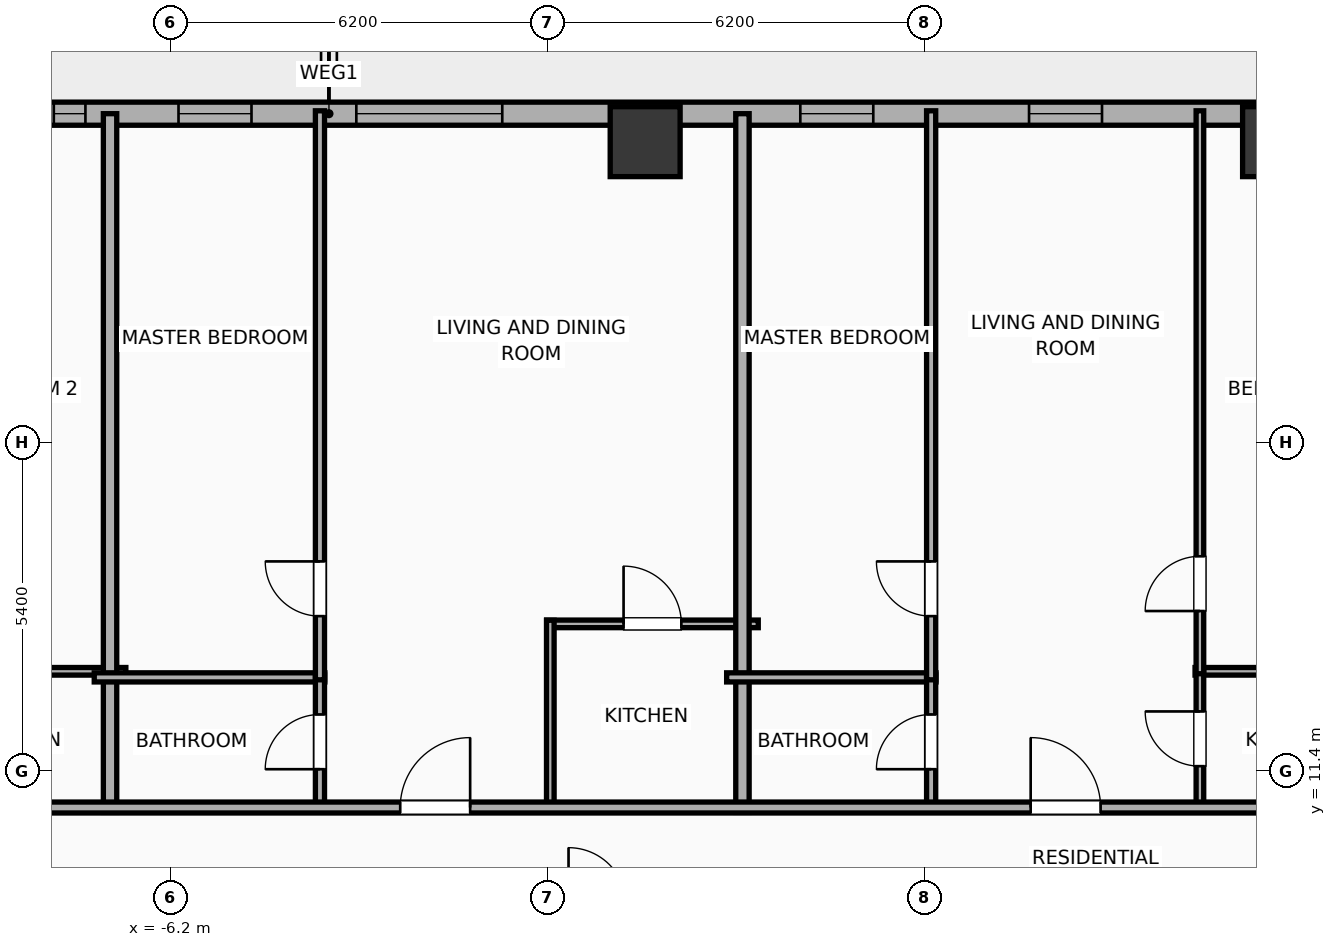
"""IFC4 building model, lengths in metres.
Left out: names, types, materials, properties, quantities, classifications, styles, units other than length and angle.
Written with IfcOpenShell. Run it as: python <this file> out.ifc"""

import sys

from ifc_helpers import new_model, si_unit, direction, frame, frame_2d, origin, origin_2d, place, context, subcontext, project, spatial, rectangle, hollow_rectangle, extrude, element, fill, save


model = new_model("IFC4")
c1 = context("Model", 3, precision=1e-05, world=origin(), true_north=direction((0.0, 1.0)))
c2 = subcontext(c1, "Body", "Model", "MODEL_VIEW")
j1 = project(units=[si_unit("LENGTHUNIT", "METRE"), si_unit("PLANEANGLEUNIT", "RADIAN")], contexts=[c1])
p1 = place(None, origin())
s1 = spatial("IfcSite", under=j1, at=p1, CompositionType="ELEMENT")
p2 = place(p1, origin())
s2 = spatial("IfcBuilding", under=s1, at=p2, CompositionType="ELEMENT")
p3 = place(p2, frame((0.0, 0.0, 53.3)))
s3 = spatial("IfcBuildingStorey", under=s2, at=p3, CompositionType="ELEMENT", Elevation=53.3)
for number, where, z_axis, x_axis in (
    (1, (12.0, 21.75, 0.0), (0.0, 0.0, 1.0), (1.0, 0.0, 0.0)),
    (2, (1.6, 21.75, 0.0), (0.0, 0.0, 1.0), (1.0, 0.0, 0.0)),
):
    element("IfcColumn", number, at=place(p3, frame(where, z_axis=z_axis, x_axis=x_axis)), inside=s3, PredefinedType="COLUMN", context=c2, shape_type="SweptSolid", body=[
        extrude(hollow_rectangle(XDim=1.15, YDim=1.15, WallThickness=0.04, at=origin_2d()), origin(), (0.0, 0.0, 1.0), 3.9),
    ])
p4 = place(p3, frame((-29.581, 22.21, 0.0), z_axis=(0.0, 0.0, 1.0), x_axis=(1.0, 0.0, 0.0)))
e3 = element("IfcWall", 3, at=p4, inside=s3, PredefinedType="ELEMENTEDWALL", context=c2, shape_type="SweptSolid", body=[
    extrude(rectangle(XDim=51.963, YDim=0.38, at=frame_2d((25.981, 0.0))), origin(), (0.0, 0.0, 1.0), 3.65),
])
p5 = place(p4, frame((6.61, 0.0, 0.75)))
e4 = element("IfcOpeningElement", 4, at=p5, cuts=e3, PredefinedType="OPENING", context=c2, shape_type="SweptSolid", body=[
    extrude(rectangle(XDim=2.4, YDim=2.1, at=frame_2d((1.2, 1.05))), frame((0.0, 0.2, 0.0), z_axis=(0.0, -1.0, 0.0), x_axis=(1.0, 0.0, 0.0)), (0.0, 0.0, 1.0), 0.4),
])
p6 = place(p4, frame((26.431, 0.0, 0.75)))
e5 = element("IfcOpeningElement", 5, at=p6, cuts=e3, PredefinedType="OPENING", context=c2, shape_type="SweptSolid", body=[
    extrude(rectangle(XDim=2.4, YDim=2.1, at=frame_2d((1.2, 1.05))), frame((0.0, 0.2, 0.0), z_axis=(0.0, -1.0, 0.0), x_axis=(1.0, 0.0, 0.0)), (0.0, 0.0, 1.0), 0.4),
])
p7 = place(p4, frame((43.752, 0.0, 0.75)))
e6 = element("IfcOpeningElement", 6, at=p7, cuts=e3, PredefinedType="OPENING", context=c2, shape_type="SweptSolid", body=[
    extrude(rectangle(XDim=2.4, YDim=2.1, at=frame_2d((1.2, 1.05))), frame((0.0, 0.2, 0.0), z_axis=(0.0, -1.0, 0.0), x_axis=(1.0, 0.0, 0.0)), (0.0, 0.0, 1.0), 0.4),
])
p8 = place(p4, frame((2.789, 0.0, 0.75)))
e7 = element("IfcOpeningElement", 7, at=p8, cuts=e3, PredefinedType="OPENING", context=c2, shape_type="SweptSolid", body=[
    extrude(rectangle(XDim=1.2, YDim=2.05, at=frame_2d((0.6, 1.025))), frame((0.0, 0.2, 0.0), z_axis=(0.0, -1.0, 0.0), x_axis=(1.0, 0.0, 0.0)), (0.0, 0.0, 1.0), 0.4),
])
p9 = place(p4, frame((16.831, 0.0, 0.75)))
e8 = element("IfcOpeningElement", 8, at=p9, cuts=e3, PredefinedType="OPENING", context=c2, shape_type="SweptSolid", body=[
    extrude(rectangle(XDim=1.2, YDim=2.05, at=frame_2d((0.6, 1.025))), frame((0.0, 0.2, 0.0), z_axis=(0.0, -1.0, 0.0), x_axis=(1.0, 0.0, 0.0)), (0.0, 0.0, 1.0), 0.4),
])
p10 = place(p4, frame((13.136, 0.0, 0.75)))
e9 = element("IfcOpeningElement", 9, at=p10, cuts=e3, PredefinedType="OPENING", context=c2, shape_type="SweptSolid", body=[
    extrude(rectangle(XDim=1.2, YDim=2.05, at=frame_2d((0.6, 1.025))), frame((0.0, 0.2, 0.0), z_axis=(0.0, -1.0, 0.0), x_axis=(1.0, 0.0, 0.0)), (0.0, 0.0, 1.0), 0.4),
])
p11 = place(p4, frame((21.456, 0.0, 0.75)))
e10 = element("IfcOpeningElement", 10, at=p11, cuts=e3, PredefinedType="OPENING", context=c2, shape_type="SweptSolid", body=[
    extrude(rectangle(XDim=0.52, YDim=2.05, at=frame_2d((0.26, 1.025))), frame((0.0, 0.2, 0.0), z_axis=(0.0, -1.0, 0.0), x_axis=(1.0, 0.0, 0.0)), (0.0, 0.0, 1.0), 0.4),
])
p12 = place(p4, frame((23.507, 0.0, 0.75)))
e11 = element("IfcOpeningElement", 11, at=p12, cuts=e3, PredefinedType="OPENING", context=c2, shape_type="SweptSolid", body=[
    extrude(rectangle(XDim=1.2, YDim=2.05, at=frame_2d((0.6, 1.025))), frame((0.0, 0.2, 0.0), z_axis=(0.0, -1.0, 0.0), x_axis=(1.0, 0.0, 0.0)), (0.0, 0.0, 1.0), 0.4),
])
p13 = place(p4, frame((37.494, 0.0, 0.75)))
e12 = element("IfcOpeningElement", 12, at=p13, cuts=e3, PredefinedType="OPENING", context=c2, shape_type="SweptSolid", body=[
    extrude(rectangle(XDim=1.2, YDim=2.05, at=frame_2d((0.6, 1.025))), frame((0.0, 0.2, 0.0), z_axis=(0.0, -1.0, 0.0), x_axis=(1.0, 0.0, 0.0)), (0.0, 0.0, 1.0), 0.4),
])
p14 = place(p4, frame((33.733, 0.0, 0.75)))
e13 = element("IfcOpeningElement", 13, at=p14, cuts=e3, PredefinedType="OPENING", context=c2, shape_type="SweptSolid", body=[
    extrude(rectangle(XDim=1.2, YDim=2.05, at=frame_2d((0.6, 1.025))), frame((0.0, 0.2, 0.0), z_axis=(0.0, -1.0, 0.0), x_axis=(1.0, 0.0, 0.0)), (0.0, 0.0, 1.0), 0.4),
])
p15 = place(p4, frame((42.323, 0.0, 0.75)))
e14 = element("IfcOpeningElement", 14, at=p15, cuts=e3, PredefinedType="OPENING", context=c2, shape_type="SweptSolid", body=[
    extrude(rectangle(XDim=0.52, YDim=2.05, at=frame_2d((0.26, 1.025))), frame((0.0, 0.2, 0.0), z_axis=(0.0, -1.0, 0.0), x_axis=(1.0, 0.0, 0.0)), (0.0, 0.0, 1.0), 0.4),
])
p16 = place(p4, frame((47.601, 0.0, 0.75)))
e15 = element("IfcOpeningElement", 15, at=p16, cuts=e3, PredefinedType="OPENING", context=c2, shape_type="SweptSolid", body=[
    extrude(rectangle(XDim=1.2, YDim=2.05, at=frame_2d((0.6, 1.025))), frame((0.0, 0.2, 0.0), z_axis=(0.0, -1.0, 0.0), x_axis=(1.0, 0.0, 0.0)), (0.0, 0.0, 1.0), 0.4),
])
p17 = place(p4, frame((49.681, 0.0, 0.75)))
e16 = element("IfcOpeningElement", 16, at=p17, cuts=e3, PredefinedType="OPENING", context=c2, shape_type="SweptSolid", body=[
    extrude(rectangle(XDim=1.2, YDim=2.05, at=frame_2d((0.6, 1.025))), frame((0.0, 0.2, 0.0), z_axis=(0.0, -1.0, 0.0), x_axis=(1.0, 0.0, 0.0)), (0.0, 0.0, 1.0), 0.4),
])
p18 = place(p3, frame((-10.29, 13.04, 0.0), z_axis=(0.0, 0.0, 1.0), x_axis=(1.0, 0.0, 0.0)))
e17 = element("IfcWall", 17, at=p18, inside=s3, PredefinedType="PARTITIONING", context=c2, shape_type="SweptSolid", body=[
    extrude(rectangle(XDim=3.35, YDim=0.125, at=frame_2d((1.675, 0.0))), origin(), (0.0, 0.0, 1.0), 3.65),
])
p19 = place(p3, frame((-7.2, 10.72, 0.0), z_axis=(0.0, 0.0, 1.0), x_axis=(0.0, 1.0, 0.0)))
e18 = element("IfcWall", 18, at=p19, inside=s3, PredefinedType="PARTITIONING", context=c2, shape_type="SweptSolid", body=[
    extrude(rectangle(XDim=11.49, YDim=0.22, at=frame_2d((5.745, 0.0))), origin(), (0.0, 0.0, 1.0), 3.65),
])
p20 = place(p3, frame((-7.46, 12.94, 0.0), z_axis=(0.0, 0.0, 1.0), x_axis=(1.0, 0.0, 0.0)))
e19 = element("IfcWall", 19, at=p20, inside=s3, PredefinedType="PLUMBINGWALL", context=c2, shape_type="SweptSolid", body=[
    extrude(rectangle(XDim=3.792, YDim=0.15, at=frame_2d((1.896, 0.0))), origin(), (0.0, 0.0, 1.0), 3.65),
])
p21 = place(p3, frame((-3.748, 10.78, 0.0), z_axis=(0.0, 0.0, 1.0), x_axis=(0.0, 1.0, 0.0)))
e20 = element("IfcWall", 20, at=p21, inside=s3, PredefinedType="PLUMBINGWALL", context=c2, shape_type="SweptSolid", body=[
    extrude(rectangle(XDim=2.2, YDim=0.15, at=frame_2d((1.1, 0.0))), origin(), (0.0, 0.0, 1.0), 3.65),
])
p22 = place(p21, frame((0.65, 0.0, 0.0)))
e21 = element("IfcOpeningElement", 21, at=p22, cuts=e20, PredefinedType="OPENING", context=c2, shape_type="SweptSolid", body=[
    extrude(rectangle(XDim=0.9, YDim=2.05, at=frame_2d((0.45, 1.025))), frame((0.0, 0.085, 0.0), z_axis=(0.0, -1.0, 0.0), x_axis=(1.0, 0.0, 0.0)), (0.0, 0.0, 1.0), 0.17),
])
p23 = place(p3, frame((-3.748, 12.9, 0.0), z_axis=(0.0, 0.0, 1.0), x_axis=(0.0, 1.0, 0.0)))
e22 = element("IfcWall", 22, at=p23, inside=s3, PredefinedType="PLUMBINGWALL", context=c2, shape_type="SweptSolid", body=[
    extrude(rectangle(XDim=9.358, YDim=0.15, at=frame_2d((4.679, 0.0))), origin(), (0.0, 0.0, 1.0), 3.65),
])
p24 = place(p23, frame((1.047, 0.0, 0.0)))
e23 = element("IfcOpeningElement", 23, at=p24, cuts=e22, PredefinedType="OPENING", context=c2, shape_type="SweptSolid", body=[
    extrude(rectangle(XDim=0.9, YDim=2.05, at=frame_2d((0.45, 1.025))), frame((0.0, 0.085, 0.0), z_axis=(0.0, -1.0, 0.0), x_axis=(1.0, 0.0, 0.0)), (0.0, 0.0, 1.0), 0.17),
])
p25 = place(p3, frame((-0.02, 13.82, 0.0), z_axis=(0.0, 0.0, 1.0), x_axis=(1.0, 0.0, 0.0)))
e24 = element("IfcWall", 24, at=p25, inside=s3, PredefinedType="PARTITIONING", context=c2, shape_type="SweptSolid", body=[
    extrude(rectangle(XDim=3.48, YDim=0.125, at=frame_2d((1.74, 0.0))), origin(), (0.0, 0.0, 1.0), 3.65),
])
p26 = place(p25, frame((1.265, 0.0, 0.0)))
e25 = element("IfcOpeningElement", 25, at=p26, cuts=e24, PredefinedType="OPENING", context=c2, shape_type="SweptSolid", body=[
    extrude(rectangle(XDim=0.95, YDim=2.05, at=frame_2d((0.475, 1.025))), frame((0.0, 0.073, 0.0), z_axis=(0.0, -1.0, 0.0), x_axis=(1.0, 0.0, 0.0)), (0.0, 0.0, 1.0), 0.145),
])
p27 = place(p3, frame((0.04, 10.78, 0.0), z_axis=(0.0, 0.0, 1.0), x_axis=(0.0, 1.0, 0.0)))
e26 = element("IfcWall", 26, at=p27, inside=s3, PredefinedType="PARTITIONING", context=c2, shape_type="SweptSolid", body=[
    extrude(rectangle(XDim=3.1, YDim=0.125, at=frame_2d((1.55, 0.0))), origin(), (0.0, 0.0, 1.0), 3.65),
])
p28 = place(p3, frame((3.2, 10.72, 0.0), z_axis=(0.0, 0.0, 1.0), x_axis=(0.0, 1.0, 0.0)))
e27 = element("IfcWall", 27, at=p28, inside=s3, PredefinedType="PARTITIONING", context=c2, shape_type="SweptSolid", body=[
    extrude(rectangle(XDim=11.49, YDim=0.22, at=frame_2d((5.745, 0.0))), origin(), (0.0, 0.0, 1.0), 2.94),
])
p29 = place(p3, frame((2.94, 12.94, 0.0), z_axis=(0.0, 0.0, 1.0), x_axis=(1.0, 0.0, 0.0)))
e28 = element("IfcWall", 28, at=p29, inside=s3, PredefinedType="PLUMBINGWALL", context=c2, shape_type="SweptSolid", body=[
    extrude(rectangle(XDim=3.443, YDim=0.15, at=frame_2d((1.722, 0.0))), origin(), (0.0, 0.0, 1.0), 3.65),
])
p30 = place(p3, frame((10.643, 13.04, 0.0), z_axis=(0.0, 0.0, 1.0), x_axis=(1.0, 0.0, 0.0)))
e29 = element("IfcWall", 29, at=p30, inside=s3, PredefinedType="PARTITIONING", context=c2, shape_type="SweptSolid", body=[
    extrude(rectangle(XDim=3.217, YDim=0.125, at=frame_2d((1.608, 0.0))), origin(), (0.0, 0.0, 1.0), 3.65),
])
p31 = place(p3, frame((6.303, 10.78, 0.0), z_axis=(0.0, 0.0, 1.0), x_axis=(0.0, 1.0, 0.0)))
e30 = element("IfcWall", 30, at=p31, inside=s3, PredefinedType="PLUMBINGWALL", context=c2, shape_type="SweptSolid", body=[
    extrude(rectangle(XDim=2.2, YDim=0.15, at=frame_2d((1.1, 0.0))), origin(), (0.0, 0.0, 1.0), 3.65),
])
p32 = place(p31, frame((0.65, 0.0, 0.0)))
e31 = element("IfcOpeningElement", 31, at=p32, cuts=e30, PredefinedType="OPENING", context=c2, shape_type="SweptSolid", body=[
    extrude(rectangle(XDim=0.9, YDim=2.05, at=frame_2d((0.45, 1.025))), frame((0.0, 0.085, 0.0), z_axis=(0.0, -1.0, 0.0), x_axis=(1.0, 0.0, 0.0)), (0.0, 0.0, 1.0), 0.17),
])
p33 = place(p3, frame((6.303, 12.9, 0.0), z_axis=(0.0, 0.0, 1.0), x_axis=(0.0, 1.0, 0.0)))
e32 = element("IfcWall", 32, at=p33, inside=s3, PredefinedType="PLUMBINGWALL", context=c2, shape_type="SweptSolid", body=[
    extrude(rectangle(XDim=9.358, YDim=0.15, at=frame_2d((4.679, 0.0))), origin(), (0.0, 0.0, 1.0), 3.65),
])
p34 = place(p33, frame((1.047, 0.0, 0.0)))
e33 = element("IfcOpeningElement", 33, at=p34, cuts=e32, PredefinedType="OPENING", context=c2, shape_type="SweptSolid", body=[
    extrude(rectangle(XDim=0.9, YDim=2.05, at=frame_2d((0.45, 1.025))), frame((0.0, 0.085, 0.0), z_axis=(0.0, -1.0, 0.0), x_axis=(1.0, 0.0, 0.0)), (0.0, 0.0, 1.0), 0.17),
])
p35 = place(p3, frame((10.723, 10.78, 0.0), z_axis=(0.0, 0.0, 1.0), x_axis=(0.0, 1.0, 0.0)))
e34 = element("IfcWall", 34, at=p35, inside=s3, PredefinedType="PARTITIONING", context=c2, shape_type="SweptSolid", body=[
    extrude(rectangle(XDim=2.3, YDim=0.125, at=frame_2d((1.15, 0.0))), origin(), (0.0, 0.0, 1.0), 3.65),
])
p36 = place(p35, frame((0.7, 0.0, 0.0)))
e35 = element("IfcOpeningElement", 35, at=p36, cuts=e34, PredefinedType="OPENING", context=c2, shape_type="SweptSolid", body=[
    extrude(rectangle(XDim=0.9, YDim=2.05, at=frame_2d((0.45, 1.025))), frame((0.0, 0.073, 0.0), z_axis=(0.0, -1.0, 0.0), x_axis=(1.0, 0.0, 0.0)), (0.0, 0.0, 1.0), 0.145),
])
p37 = place(p3, frame((10.723, 13.0, 0.0), z_axis=(0.0, 0.0, 1.0), x_axis=(0.0, 1.0, 0.0)))
e36 = element("IfcWall", 36, at=p37, inside=s3, PredefinedType="PARTITIONING", context=c2, shape_type="SweptSolid", body=[
    extrude(rectangle(XDim=9.258, YDim=0.125, at=frame_2d((4.629, 0.0))), origin(), (0.0, 0.0, 1.0), 3.65),
])
p38 = place(p37, frame((1.031, 0.0, 0.0)))
e37 = element("IfcOpeningElement", 37, at=p38, cuts=e36, PredefinedType="OPENING", context=c2, shape_type="SweptSolid", body=[
    extrude(rectangle(XDim=0.9, YDim=2.05, at=frame_2d((0.45, 1.025))), frame((0.0, 0.073, 0.0), z_axis=(0.0, -1.0, 0.0), x_axis=(1.0, 0.0, 0.0)), (0.0, 0.0, 1.0), 0.145),
])
p39 = place(p3, frame((-33.41, 10.8, 0.0), z_axis=(0.0, 0.0, 1.0), x_axis=(1.0, 0.0, 0.0)))
e38 = element("IfcWall", 38, at=p39, inside=s3, PredefinedType="PARTITIONING", context=c2, shape_type="SweptSolid", body=[
    extrude(rectangle(XDim=59.62, YDim=0.18, at=frame_2d((29.81, 0.0))), origin(), (0.0, 0.0, 1.0), 3.65),
])
p40 = place(p39, frame((2.501, 0.0, 0.0)))
e39 = element("IfcOpeningElement", 39, at=p40, cuts=e38, PredefinedType="OPENING", context=c2, shape_type="SweptSolid", body=[
    extrude(rectangle(XDim=0.9, YDim=2.05, at=frame_2d((0.45, 1.025))), frame((0.0, 0.1, 0.0), z_axis=(0.0, -1.0, 0.0), x_axis=(1.0, 0.0, 0.0)), (0.0, 0.0, 1.0), 0.2),
])
p41 = place(p39, frame((10.156, 0.0, 0.0)))
e40 = element("IfcOpeningElement", 40, at=p41, cuts=e38, PredefinedType="OPENING", context=c2, shape_type="SweptSolid", body=[
    extrude(rectangle(XDim=1.15, YDim=2.05, at=frame_2d((0.575, 1.025))), frame((0.0, 0.1, 0.0), z_axis=(0.0, -1.0, 0.0), x_axis=(1.0, 0.0, 0.0)), (0.0, 0.0, 1.0), 0.2),
])
p42 = place(p39, frame((20.686, 0.0, 0.0)))
e41 = element("IfcOpeningElement", 41, at=p42, cuts=e38, PredefinedType="OPENING", context=c2, shape_type="SweptSolid", body=[
    extrude(rectangle(XDim=1.15, YDim=2.05, at=frame_2d((0.575, 1.025))), frame((0.0, 0.1, 0.0), z_axis=(0.0, -1.0, 0.0), x_axis=(1.0, 0.0, 0.0)), (0.0, 0.0, 1.0), 0.2),
])
p43 = place(p39, frame((30.982, 0.0, 0.0)))
e42 = element("IfcOpeningElement", 42, at=p43, cuts=e38, PredefinedType="OPENING", context=c2, shape_type="SweptSolid", body=[
    extrude(rectangle(XDim=1.15, YDim=2.05, at=frame_2d((0.575, 1.025))), frame((0.0, 0.1, 0.0), z_axis=(0.0, -1.0, 0.0), x_axis=(1.0, 0.0, 0.0)), (0.0, 0.0, 1.0), 0.2),
])
p44 = place(p39, frame((41.35, 0.0, 0.0)))
e43 = element("IfcOpeningElement", 43, at=p44, cuts=e38, PredefinedType="OPENING", context=c2, shape_type="SweptSolid", body=[
    extrude(rectangle(XDim=1.15, YDim=2.05, at=frame_2d((0.575, 1.025))), frame((0.0, 0.1, 0.0), z_axis=(0.0, -1.0, 0.0), x_axis=(1.0, 0.0, 0.0)), (0.0, 0.0, 1.0), 0.2),
])
p45 = place(p39, frame((48.331, 0.0, 0.0)))
e44 = element("IfcOpeningElement", 44, at=p45, cuts=e38, PredefinedType="OPENING", context=c2, shape_type="SweptSolid", body=[
    extrude(rectangle(XDim=1.15, YDim=2.05, at=frame_2d((0.575, 1.025))), frame((0.0, 0.1, 0.0), z_axis=(0.0, -1.0, 0.0), x_axis=(1.0, 0.0, 0.0)), (0.0, 0.0, 1.0), 0.2),
])
p46 = place(p39, frame((56.177, 0.0, 0.0)))
e45 = element("IfcOpeningElement", 45, at=p46, cuts=e38, PredefinedType="OPENING", context=c2, shape_type="SweptSolid", body=[
    extrude(rectangle(XDim=0.9, YDim=2.05, at=frame_2d((0.45, 1.025))), frame((0.0, 0.1, 0.0), z_axis=(0.0, -1.0, 0.0), x_axis=(1.0, 0.0, 0.0)), (0.0, 0.0, 1.0), 0.2),
])
p47 = place(p6, origin())
e46 = element("IfcWindow", 46, at=p47, inside=s3, PartitioningType="SINGLE_PANEL", PredefinedType="WINDOW", context=c2, shape_type="SweptSolid", body=[
    extrude(rectangle(XDim=2.4, YDim=2.1, at=frame_2d((1.2, 1.05))), frame((0.0, 0.03, 0.0), z_axis=(0.0, -1.0, 0.0), x_axis=(1.0, 0.0, 0.0)), (0.0, 0.0, 1.0), 0.06),
])
fill(e5, e46)
p48 = place(p11, origin())
e47 = element("IfcWindow", 47, at=p48, inside=s3, PartitioningType="SINGLE_PANEL", PredefinedType="WINDOW", context=c2, shape_type="SweptSolid", body=[
    extrude(rectangle(XDim=0.52, YDim=2.05, at=frame_2d((0.26, 1.025))), frame((0.0, 0.03, 0.0), z_axis=(0.0, -1.0, 0.0), x_axis=(1.0, 0.0, 0.0)), (0.0, 0.0, 1.0), 0.06),
])
fill(e10, e47)
p49 = place(p12, origin())
e48 = element("IfcWindow", 48, at=p49, inside=s3, PartitioningType="SINGLE_PANEL", PredefinedType="WINDOW", context=c2, shape_type="SweptSolid", body=[
    extrude(rectangle(XDim=1.2, YDim=2.05, at=frame_2d((0.6, 1.025))), frame((0.0, 0.03, 0.0), z_axis=(0.0, -1.0, 0.0), x_axis=(1.0, 0.0, 0.0)), (0.0, 0.0, 1.0), 0.06),
])
fill(e11, e48)
p50 = place(p13, origin())
e49 = element("IfcWindow", 49, at=p50, inside=s3, PartitioningType="SINGLE_PANEL", PredefinedType="WINDOW", context=c2, shape_type="SweptSolid", body=[
    extrude(rectangle(XDim=1.2, YDim=2.05, at=frame_2d((0.6, 1.025))), frame((0.0, 0.03, 0.0), z_axis=(0.0, -1.0, 0.0), x_axis=(1.0, 0.0, 0.0)), (0.0, 0.0, 1.0), 0.06),
])
fill(e12, e49)
p51 = place(p14, origin())
e50 = element("IfcWindow", 50, at=p51, inside=s3, PartitioningType="SINGLE_PANEL", PredefinedType="WINDOW", context=c2, shape_type="SweptSolid", body=[
    extrude(rectangle(XDim=1.2, YDim=2.05, at=frame_2d((0.6, 1.025))), frame((0.0, 0.03, 0.0), z_axis=(0.0, -1.0, 0.0), x_axis=(1.0, 0.0, 0.0)), (0.0, 0.0, 1.0), 0.06),
])
fill(e13, e50)
p52 = place(p22, origin())
e51 = element("IfcDoor", 51, at=p52, inside=s3, OperationType="SINGLE_SWING_LEFT", PredefinedType="DOOR", context=c2, shape_type="SweptSolid", body=[
    extrude(rectangle(XDim=0.9, YDim=2.05, at=frame_2d((0.45, 1.025))), frame((0.0, 0.025, 0.0), z_axis=(0.0, -1.0, 0.0), x_axis=(1.0, 0.0, 0.0)), (0.0, 0.0, 1.0), 0.05),
])
fill(e21, e51)
p53 = place(p24, origin())
e52 = element("IfcDoor", 52, at=p53, inside=s3, OperationType="SINGLE_SWING_RIGHT", PredefinedType="DOOR", context=c2, shape_type="SweptSolid", body=[
    extrude(rectangle(XDim=0.9, YDim=2.05, at=frame_2d((0.45, 1.025))), frame((0.0, 0.025, 0.0), z_axis=(0.0, -1.0, 0.0), x_axis=(1.0, 0.0, 0.0)), (0.0, 0.0, 1.0), 0.05),
])
fill(e23, e52)
p54 = place(p26, origin())
e53 = element("IfcDoor", 53, at=p54, inside=s3, OperationType="SINGLE_SWING_LEFT", PredefinedType="DOOR", context=c2, shape_type="SweptSolid", body=[
    extrude(rectangle(XDim=0.95, YDim=2.05, at=frame_2d((0.475, 1.025))), frame((0.0, 0.025, 0.0), z_axis=(0.0, -1.0, 0.0), x_axis=(1.0, 0.0, 0.0)), (0.0, 0.0, 1.0), 0.05),
])
fill(e25, e53)
p55 = place(p32, origin())
e54 = element("IfcDoor", 54, at=p55, inside=s3, OperationType="SINGLE_SWING_LEFT", PredefinedType="DOOR", context=c2, shape_type="SweptSolid", body=[
    extrude(rectangle(XDim=0.9, YDim=2.05, at=frame_2d((0.45, 1.025))), frame((0.0, 0.025, 0.0), z_axis=(0.0, -1.0, 0.0), x_axis=(1.0, 0.0, 0.0)), (0.0, 0.0, 1.0), 0.05),
])
fill(e31, e54)
p56 = place(p34, origin())
e55 = element("IfcDoor", 55, at=p56, inside=s3, OperationType="SINGLE_SWING_RIGHT", PredefinedType="DOOR", context=c2, shape_type="SweptSolid", body=[
    extrude(rectangle(XDim=0.9, YDim=2.05, at=frame_2d((0.45, 1.025))), frame((0.0, 0.025, 0.0), z_axis=(0.0, -1.0, 0.0), x_axis=(1.0, 0.0, 0.0)), (0.0, 0.0, 1.0), 0.05),
])
fill(e33, e55)
p57 = place(p36, origin())
e56 = element("IfcDoor", 56, at=p57, inside=s3, OperationType="SINGLE_SWING_RIGHT", PredefinedType="DOOR", context=c2, shape_type="SweptSolid", body=[
    extrude(rectangle(XDim=0.9, YDim=2.05, at=frame_2d((0.45, 1.025))), frame((0.0, 0.025, 0.0), z_axis=(0.0, -1.0, 0.0), x_axis=(1.0, 0.0, 0.0)), (0.0, 0.0, 1.0), 0.05),
])
fill(e35, e56)
p58 = place(p38, origin())
e57 = element("IfcDoor", 57, at=p58, inside=s3, OperationType="SINGLE_SWING_LEFT", PredefinedType="DOOR", context=c2, shape_type="SweptSolid", body=[
    extrude(rectangle(XDim=0.9, YDim=2.05, at=frame_2d((0.45, 1.025))), frame((0.0, 0.025, 0.0), z_axis=(0.0, -1.0, 0.0), x_axis=(1.0, 0.0, 0.0)), (0.0, 0.0, 1.0), 0.05),
])
fill(e37, e57)
p59 = place(p43, origin())
e58 = element("IfcDoor", 58, at=p59, inside=s3, OperationType="SINGLE_SWING_RIGHT", PredefinedType="DOOR", context=c2, shape_type="SweptSolid", body=[
    extrude(rectangle(XDim=1.15, YDim=2.05, at=frame_2d((0.575, 1.025))), frame((0.0, 0.025, 0.0), z_axis=(0.0, -1.0, 0.0), x_axis=(1.0, 0.0, 0.0)), (0.0, 0.0, 1.0), 0.05),
])
fill(e42, e58)
p60 = place(p44, origin())
e59 = element("IfcDoor", 59, at=p60, inside=s3, OperationType="SINGLE_SWING_LEFT", PredefinedType="DOOR", context=c2, shape_type="SweptSolid", body=[
    extrude(rectangle(XDim=1.15, YDim=2.05, at=frame_2d((0.575, 1.025))), frame((0.0, 0.025, 0.0), z_axis=(0.0, -1.0, 0.0), x_axis=(1.0, 0.0, 0.0)), (0.0, 0.0, 1.0), 0.05),
])
fill(e43, e59)
save(model, sys.argv[1])
